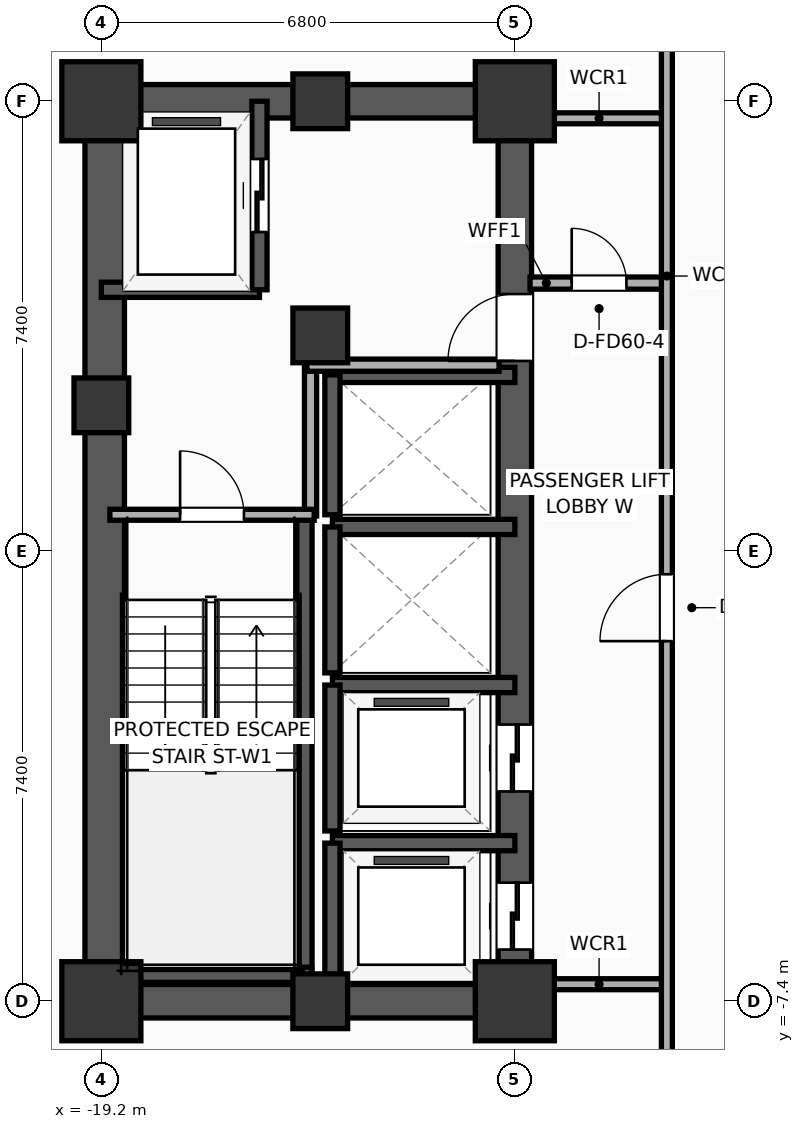
"""IFC4 building model, lengths in metres.
Left out: names, types, materials, properties, quantities, classifications, styles, units other than length and angle.
Written with IfcOpenShell. Run it as: python <this file> out.ifc"""

import sys

from ifc_helpers import new_model, si_unit, direction, frame, frame_2d, origin, origin_2d, place, context, subcontext, project, spatial, rectangle, extrude, element, fill, save


model = new_model("IFC4")
c1 = context("Model", 3, precision=1e-05, world=origin(), true_north=direction((0.0, 1.0)))
c2 = subcontext(c1, "Body", "Model", "MODEL_VIEW")
j1 = project(units=[si_unit("LENGTHUNIT", "METRE"), si_unit("PLANEANGLEUNIT", "RADIAN")], contexts=[c1])
p1 = place(None, origin())
s1 = spatial("IfcSite", under=j1, at=p1, CompositionType="ELEMENT")
p2 = place(p1, origin())
s2 = spatial("IfcBuilding", under=s1, at=p2, CompositionType="ELEMENT")
p3 = place(p2, frame((0.0, 0.0, 132.6)))
s3 = spatial("IfcBuildingStorey", under=s2, at=p3, CompositionType="ELEMENT", Elevation=132.6)
p4 = place(p3, frame((-19.2, -7.4, 0.0), z_axis=(0.0, 0.0, 1.0), x_axis=(1.0, 0.0, 0.0)))
e1 = element("IfcColumn", 1, at=p4, inside=s3, PredefinedType="COLUMN", context=c2, shape_type="SweptSolid", body=[
    extrude(rectangle(XDim=1.3, YDim=1.3, at=origin_2d()), origin(), (0.0, 0.0, 1.0), 3.9),
])
p5 = place(p3, frame((-19.2, 2.4, 0.0), z_axis=(0.0, 0.0, 1.0), x_axis=(1.0, 0.0, 0.0)))
e2 = element("IfcColumn", 2, at=p5, inside=s3, PredefinedType="COLUMN", context=c2, shape_type="SweptSolid", body=[
    extrude(rectangle(XDim=0.9, YDim=0.9, at=origin_2d()), origin(), (0.0, 0.0, 1.0), 3.9),
])
p6 = place(p3, frame((-19.2, 7.4, 0.0), z_axis=(0.0, 0.0, 1.0), x_axis=(1.0, 0.0, 0.0)))
e3 = element("IfcColumn", 3, at=p6, inside=s3, PredefinedType="COLUMN", context=c2, shape_type="SweptSolid", body=[
    extrude(rectangle(XDim=1.3, YDim=1.3, at=origin_2d()), origin(), (0.0, 0.0, 1.0), 3.9),
])
for number, where, z_axis, x_axis in (
    (4, (-15.6, -7.4, 0.0), (0.0, 0.0, 1.0), (1.0, 0.0, 0.0)),
    (5, (-15.6, 7.4, 0.0), (0.0, 0.0, 1.0), (1.0, 0.0, 0.0)),
):
    element("IfcColumn", number, at=place(p3, frame(where, z_axis=z_axis, x_axis=x_axis)), inside=s3, PredefinedType="COLUMN", context=c2, shape_type="SweptSolid", body=[
        extrude(rectangle(XDim=0.9, YDim=0.9, at=origin_2d()), origin(), (0.0, 0.0, 1.0), 3.9),
    ])
p7 = place(p3, frame((-12.4, -7.4, 0.0), z_axis=(0.0, 0.0, 1.0), x_axis=(1.0, 0.0, 0.0)))
e6 = element("IfcColumn", 6, at=p7, inside=s3, PredefinedType="COLUMN", context=c2, shape_type="SweptSolid", body=[
    extrude(rectangle(XDim=1.3, YDim=1.3, at=origin_2d()), origin(), (0.0, 0.0, 1.0), 3.9),
])
p8 = place(p3, frame((-15.6, 3.55, 0.0), z_axis=(0.0, 0.0, 1.0), x_axis=(1.0, 0.0, 0.0)))
e7 = element("IfcColumn", 7, at=p8, inside=s3, PredefinedType="COLUMN", context=c2, shape_type="SweptSolid", body=[
    extrude(rectangle(XDim=0.9, YDim=0.9, at=origin_2d()), origin(), (0.0, 0.0, 1.0), 3.9),
])
p9 = place(p3, frame((-12.4, 7.4, 0.0), z_axis=(0.0, 0.0, 1.0), x_axis=(1.0, 0.0, 0.0)))
e8 = element("IfcColumn", 8, at=p9, inside=s3, PredefinedType="COLUMN", context=c2, shape_type="SweptSolid", body=[
    extrude(rectangle(XDim=1.3, YDim=1.3, at=origin_2d()), origin(), (0.0, 0.0, 1.0), 3.9),
])
for number, where, z_axis, x_axis in (
    (9, (-19.475, -7.4, 0.0), (0.0, 0.0, 1.0), (1.0, 0.0, 0.0)),
    (10, (-19.475, 7.4, 0.0), (0.0, 0.0, 1.0), (1.0, 0.0, 0.0)),
):
    element("IfcWall", number, at=place(p3, frame(where, z_axis=z_axis, x_axis=x_axis)), inside=s3, PredefinedType="SHEAR", context=c2, shape_type="SweptSolid", body=[
        extrude(rectangle(XDim=7.35, YDim=0.55, at=frame_2d((3.675, 0.0))), origin(), (0.0, 0.0, 1.0), 3.65),
    ])
p10 = place(p3, frame((-19.145, -7.4, 0.0), z_axis=(0.0, 0.0, 1.0), x_axis=(0.0, 1.0, 0.0)))
e11 = element("IfcWall", 11, at=p10, inside=s3, PredefinedType="SHEAR", context=c2, shape_type="SweptSolid", body=[
    extrude(rectangle(XDim=14.8, YDim=0.65, at=frame_2d((7.4, 0.0))), origin(), (0.0, 0.0, 1.0), 3.65),
])
p11 = place(p3, frame((-12.4, -7.4, 0.0), z_axis=(0.0, 0.0, 1.0), x_axis=(0.0, 1.0, 0.0)))
e12 = element("IfcWall", 12, at=p11, inside=s3, PredefinedType="SHEAR", context=c2, shape_type="SweptSolid", body=[
    extrude(rectangle(XDim=14.8, YDim=0.55, at=frame_2d((7.4, 0.0))), origin(), (0.0, 0.0, 1.0), 3.65),
])
p12 = place(p11, frame((0.85, 0.0, 0.0)))
e13 = element("IfcOpeningElement", 13, at=p12, cuts=e12, PredefinedType="OPENING", context=c2, shape_type="SweptSolid", body=[
    extrude(rectangle(XDim=1.1, YDim=2.05, at=frame_2d((0.55, 1.025))), frame((0.0, 0.285, 0.0), z_axis=(0.0, -1.0, 0.0), x_axis=(1.0, 0.0, 0.0)), (0.0, 0.0, 1.0), 0.57),
])
p13 = place(p11, frame((3.45, 0.0, 0.0)))
e14 = element("IfcOpeningElement", 14, at=p13, cuts=e12, PredefinedType="OPENING", context=c2, shape_type="SweptSolid", body=[
    extrude(rectangle(XDim=1.1, YDim=2.05, at=frame_2d((0.55, 1.025))), frame((0.0, 0.285, 0.0), z_axis=(0.0, -1.0, 0.0), x_axis=(1.0, 0.0, 0.0)), (0.0, 0.0, 1.0), 0.57),
])
p14 = place(p11, frame((10.53, 0.0, 0.0)))
e15 = element("IfcOpeningElement", 15, at=p14, cuts=e12, PredefinedType="OPENING", context=c2, shape_type="SweptSolid", body=[
    extrude(rectangle(XDim=1.1, YDim=2.05, at=frame_2d((0.55, 1.025))), frame((0.0, 0.285, 0.0), z_axis=(0.0, -1.0, 0.0), x_axis=(1.0, 0.0, 0.0)), (0.0, 0.0, 1.0), 0.57),
])
p15 = place(p3, frame((-15.86, -7.085, 0.0), z_axis=(0.0, 0.0, 1.0), x_axis=(0.0, 1.0, 0.0)))
e16 = element("IfcWall", 16, at=p15, inside=s3, PredefinedType="SOLIDWALL", context=c2, shape_type="SweptSolid", body=[
    extrude(rectangle(XDim=7.685, YDim=0.25, at=frame_2d((3.843, 0.0))), origin(), (0.0, 0.0, 1.0), 3.65),
])
p16 = place(p3, frame((-19.2, -6.965, 0.0), z_axis=(0.0, 0.0, 1.0), x_axis=(1.0, 0.0, 0.0)))
e17 = element("IfcWall", 17, at=p16, inside=s3, PredefinedType="SOLIDWALL", context=c2, shape_type="SweptSolid", body=[
    extrude(rectangle(XDim=3.46, YDim=0.25, at=frame_2d((1.73, 0.0))), origin(), (0.0, 0.0, 1.0), 3.65),
])
p17 = place(p3, frame((-19.2, 4.3, 0.0), z_axis=(0.0, 0.0, 1.0), x_axis=(1.0, 0.0, 0.0)))
e18 = element("IfcWall", 18, at=p17, inside=s3, PredefinedType="SOLIDWALL", context=c2, shape_type="SweptSolid", body=[
    extrude(rectangle(XDim=2.6, YDim=0.25, at=frame_2d((1.3, 0.0))), origin(), (0.0, 0.0, 1.0), 3.65),
])
p18 = place(p3, frame((-16.6, 4.3, 0.0), z_axis=(0.0, 0.0, 1.0), x_axis=(0.0, 1.0, 0.0)))
e19 = element("IfcWall", 19, at=p18, inside=s3, PredefinedType="SOLIDWALL", context=c2, shape_type="SweptSolid", body=[
    extrude(rectangle(XDim=3.1, YDim=0.25, at=frame_2d((1.55, 0.0))), origin(), (0.0, 0.0, 1.0), 3.65),
])
p19 = place(p18, frame((0.95, 0.0, 0.0)))
e20 = element("IfcOpeningElement", 20, at=p19, cuts=e19, PredefinedType="OPENING", context=c2, shape_type="SweptSolid", body=[
    extrude(rectangle(XDim=1.2, YDim=2.05, at=frame_2d((0.6, 1.025))), frame((0.0, 0.135, 0.0), z_axis=(0.0, -1.0, 0.0), x_axis=(1.0, 0.0, 0.0)), (0.0, 0.0, 1.0), 0.27),
])
p20 = place(p3, frame((-12.4, -4.8, 0.0), z_axis=(0.0, 0.0, 1.0), x_axis=(-1.0, 0.0, 0.0)))
e21 = element("IfcWall", 21, at=p20, inside=s3, PredefinedType="SOLIDWALL", context=c2, shape_type="SweptSolid", body=[
    extrude(rectangle(XDim=3.0, YDim=0.25, at=frame_2d((1.5, 0.0))), origin(), (0.0, 0.0, 1.0), 3.65),
])
p21 = place(p3, frame((-15.4, -4.8, 0.0), z_axis=(0.0, 0.0, 1.0), x_axis=(0.0, -1.0, 0.0)))
e22 = element("IfcWall", 22, at=p21, inside=s3, PredefinedType="SOLIDWALL", context=c2, shape_type="SweptSolid", body=[
    extrude(rectangle(XDim=2.6, YDim=0.25, at=frame_2d((1.3, 0.0))), origin(), (0.0, 0.0, 1.0), 3.65),
])
p22 = place(p3, frame((-12.4, -2.2, 0.0), z_axis=(0.0, 0.0, 1.0), x_axis=(-1.0, 0.0, 0.0)))
e23 = element("IfcWall", 23, at=p22, inside=s3, PredefinedType="SOLIDWALL", context=c2, shape_type="SweptSolid", body=[
    extrude(rectangle(XDim=3.0, YDim=0.25, at=frame_2d((1.5, 0.0))), origin(), (0.0, 0.0, 1.0), 3.65),
])
p23 = place(p3, frame((-15.4, -2.2, 0.0), z_axis=(0.0, 0.0, 1.0), x_axis=(0.0, -1.0, 0.0)))
e24 = element("IfcWall", 24, at=p23, inside=s3, PredefinedType="SOLIDWALL", context=c2, shape_type="SweptSolid", body=[
    extrude(rectangle(XDim=2.4, YDim=0.25, at=frame_2d((1.2, 0.0))), origin(), (0.0, 0.0, 1.0), 3.65),
])
p24 = place(p3, frame((-12.4, 0.4, 0.0), z_axis=(0.0, 0.0, 1.0), x_axis=(-1.0, 0.0, 0.0)))
e25 = element("IfcWall", 25, at=p24, inside=s3, PredefinedType="SOLIDWALL", context=c2, shape_type="SweptSolid", body=[
    extrude(rectangle(XDim=3.0, YDim=0.25, at=frame_2d((1.5, 0.0))), origin(), (0.0, 0.0, 1.0), 3.65),
])
p25 = place(p3, frame((-15.4, 0.4, 0.0), z_axis=(0.0, 0.0, 1.0), x_axis=(0.0, -1.0, 0.0)))
e26 = element("IfcWall", 26, at=p25, inside=s3, PredefinedType="SOLIDWALL", context=c2, shape_type="SweptSolid", body=[
    extrude(rectangle(XDim=2.4, YDim=0.25, at=frame_2d((1.2, 0.0))), origin(), (0.0, 0.0, 1.0), 3.65),
])
p26 = place(p3, frame((-12.4, 2.9, 0.0), z_axis=(0.0, 0.0, 1.0), x_axis=(-1.0, 0.0, 0.0)))
e27 = element("IfcWall", 27, at=p26, inside=s3, PredefinedType="SOLIDWALL", context=c2, shape_type="SweptSolid", body=[
    extrude(rectangle(XDim=3.0, YDim=0.25, at=frame_2d((1.5, 0.0))), origin(), (0.0, 0.0, 1.0), 3.65),
])
p27 = place(p3, frame((-15.4, 2.9, 0.0), z_axis=(0.0, 0.0, 1.0), x_axis=(0.0, -1.0, 0.0)))
e28 = element("IfcWall", 28, at=p27, inside=s3, PredefinedType="SOLIDWALL", context=c2, shape_type="SweptSolid", body=[
    extrude(rectangle(XDim=2.3, YDim=0.25, at=frame_2d((1.15, 0.0))), origin(), (0.0, 0.0, 1.0), 3.65),
])
p28 = place(p3, frame((-15.76, 0.58, 0.0), z_axis=(0.0, 0.0, 1.0), x_axis=(0.0, 1.0, 0.0)))
e29 = element("IfcWall", 29, at=p28, inside=s3, PredefinedType="PARTITIONING", context=c2, shape_type="SweptSolid", body=[
    extrude(rectangle(XDim=2.52, YDim=0.2, at=frame_2d((1.26, 0.0))), origin(), (0.0, 0.0, 1.0), 3.65),
])
p29 = place(p3, frame((-15.82, 3.06, 0.0), z_axis=(0.0, 0.0, 1.0), x_axis=(1.0, 0.0, 0.0)))
e30 = element("IfcWall", 30, at=p29, inside=s3, PredefinedType="PARTITIONING", context=c2, shape_type="SweptSolid", body=[
    extrude(rectangle(XDim=3.16, YDim=0.2, at=frame_2d((1.58, 0.0))), origin(), (0.0, 0.0, 1.0), 3.65),
])
p30 = place(p3, frame((-19.06, 0.6, 0.0), z_axis=(0.0, 0.0, 1.0), x_axis=(1.0, 0.0, 0.0)))
e31 = element("IfcWall", 31, at=p30, inside=s3, PredefinedType="PARTITIONING", context=c2, shape_type="SweptSolid", body=[
    extrude(rectangle(XDim=3.36, YDim=0.18, at=frame_2d((1.68, 0.0))), origin(), (0.0, 0.0, 1.0), 3.65),
])
p31 = place(p30, frame((1.155, 0.0, 0.0)))
e32 = element("IfcOpeningElement", 32, at=p31, cuts=e31, PredefinedType="OPENING", context=c2, shape_type="SweptSolid", body=[
    extrude(rectangle(XDim=1.05, YDim=2.05, at=frame_2d((0.525, 1.025))), frame((0.0, 0.1, 0.0), z_axis=(0.0, -1.0, 0.0), x_axis=(1.0, 0.0, 0.0)), (0.0, 0.0, 1.0), 0.2),
])
p32 = place(p3, frame((-12.15, 4.41, 0.0), z_axis=(0.0, 0.0, 1.0), x_axis=(1.0, 0.0, 0.0)))
e33 = element("IfcWall", 33, at=p32, inside=s3, PredefinedType="PARTITIONING", context=c2, shape_type="SweptSolid", body=[
    extrude(rectangle(XDim=2.27, YDim=0.2, at=frame_2d((1.135, 0.0))), origin(), (0.0, 0.0, 1.0), 3.65),
])
p33 = place(p32, frame((0.685, 0.0, 0.0)))
e34 = element("IfcOpeningElement", 34, at=p33, cuts=e33, PredefinedType="OPENING", context=c2, shape_type="SweptSolid", body=[
    extrude(rectangle(XDim=0.9, YDim=2.05, at=frame_2d((0.45, 1.025))), frame((0.0, 0.11, 0.0), z_axis=(0.0, -1.0, 0.0), x_axis=(1.0, 0.0, 0.0)), (0.0, 0.0, 1.0), 0.22),
])
for number, where, z_axis, x_axis in (
    (35, (-12.15, 7.12, 0.0), (0.0, 0.0, 1.0), (1.0, 0.0, 0.0)),
    (36, (-12.15, -7.12, 0.0), (0.0, 0.0, 1.0), (1.0, 0.0, 0.0)),
):
    element("IfcWall", number, at=place(p3, frame(where, z_axis=z_axis, x_axis=x_axis)), inside=s3, PredefinedType="PARTITIONING", context=c2, shape_type="SweptSolid", body=[
        extrude(rectangle(XDim=2.27, YDim=0.18, at=frame_2d((1.135, 0.0))), origin(), (0.0, 0.0, 1.0), 3.65),
    ])
p34 = place(p3, frame((-9.9, -9.28, 0.0), z_axis=(0.0, 0.0, 1.0), x_axis=(0.0, 1.0, 0.0)))
e37 = element("IfcWall", 37, at=p34, inside=s3, PredefinedType="PARTITIONING", context=c2, shape_type="SweptSolid", body=[
    extrude(rectangle(XDim=18.56, YDim=0.18, at=frame_2d((9.28, 0.0))), origin(), (0.0, 0.0, 1.0), 3.65),
])
p35 = place(p34, frame((7.802, 0.0, 0.0)))
e38 = element("IfcOpeningElement", 38, at=p35, cuts=e37, PredefinedType="OPENING", context=c2, shape_type="SweptSolid", body=[
    extrude(rectangle(XDim=1.1, YDim=2.05, at=frame_2d((0.55, 1.025))), frame((0.0, 0.1, 0.0), z_axis=(0.0, -1.0, 0.0), x_axis=(1.0, 0.0, 0.0)), (0.0, 0.0, 1.0), 0.2),
])
p36 = place(p19, origin())
e39 = element("IfcDoor", 39, at=p36, inside=s3, OperationType="SLIDING_TO_LEFT", PredefinedType="DOOR", context=c2, shape_type="SweptSolid", body=[
    extrude(rectangle(XDim=1.2, YDim=2.05, at=frame_2d((0.6, 1.025))), frame((0.0, 0.025, 0.0), z_axis=(0.0, -1.0, 0.0), x_axis=(1.0, 0.0, 0.0)), (0.0, 0.0, 1.0), 0.05),
])
fill(e20, e39)
p37 = place(p12, origin())
e40 = element("IfcDoor", 40, at=p37, inside=s3, OperationType="SLIDING_TO_LEFT", PredefinedType="DOOR", context=c2, shape_type="SweptSolid", body=[
    extrude(rectangle(XDim=1.1, YDim=2.05, at=frame_2d((0.55, 1.025))), frame((0.0, 0.025, 0.0), z_axis=(0.0, -1.0, 0.0), x_axis=(1.0, 0.0, 0.0)), (0.0, 0.0, 1.0), 0.05),
])
fill(e13, e40)
p38 = place(p13, origin())
e41 = element("IfcDoor", 41, at=p38, inside=s3, OperationType="SLIDING_TO_LEFT", PredefinedType="DOOR", context=c2, shape_type="SweptSolid", body=[
    extrude(rectangle(XDim=1.1, YDim=2.05, at=frame_2d((0.55, 1.025))), frame((0.0, 0.025, 0.0), z_axis=(0.0, -1.0, 0.0), x_axis=(1.0, 0.0, 0.0)), (0.0, 0.0, 1.0), 0.05),
])
fill(e14, e41)
p39 = place(p31, origin())
e42 = element("IfcDoor", 42, at=p39, inside=s3, OperationType="SINGLE_SWING_LEFT", PredefinedType="DOOR", context=c2, shape_type="SweptSolid", body=[
    extrude(rectangle(XDim=1.05, YDim=2.05, at=frame_2d((0.525, 1.025))), frame((0.0, 0.025, 0.0), z_axis=(0.0, -1.0, 0.0), x_axis=(1.0, 0.0, 0.0)), (0.0, 0.0, 1.0), 0.05),
])
fill(e32, e42)
p40 = place(p33, origin())
e43 = element("IfcDoor", 43, at=p40, inside=s3, OperationType="SINGLE_SWING_LEFT", PredefinedType="DOOR", context=c2, shape_type="SweptSolid", body=[
    extrude(rectangle(XDim=0.9, YDim=2.05, at=frame_2d((0.45, 1.025))), frame((0.0, 0.025, 0.0), z_axis=(0.0, -1.0, 0.0), x_axis=(1.0, 0.0, 0.0)), (0.0, 0.0, 1.0), 0.05),
])
fill(e34, e43)
p41 = place(p35, origin())
e44 = element("IfcDoor", 44, at=p41, inside=s3, OperationType="SINGLE_SWING_LEFT", PredefinedType="DOOR", context=c2, shape_type="SweptSolid", body=[
    extrude(rectangle(XDim=1.1, YDim=2.05, at=frame_2d((0.55, 1.025))), frame((0.0, 0.025, 0.0), z_axis=(0.0, -1.0, 0.0), x_axis=(1.0, 0.0, 0.0)), (0.0, 0.0, 1.0), 0.05),
])
fill(e38, e44)
p42 = place(p14, origin())
e45 = element("IfcDoor", 45, at=p42, inside=s3, OperationType="SINGLE_SWING_LEFT", PredefinedType="DOOR", context=c2, shape_type="SweptSolid", body=[
    extrude(rectangle(XDim=1.1, YDim=2.05, at=frame_2d((0.55, 1.025))), frame((0.0, 0.025, 0.0), z_axis=(0.0, -1.0, 0.0), x_axis=(1.0, 0.0, 0.0)), (0.0, 0.0, 1.0), 0.05),
])
fill(e15, e45)
save(model, sys.argv[1])
